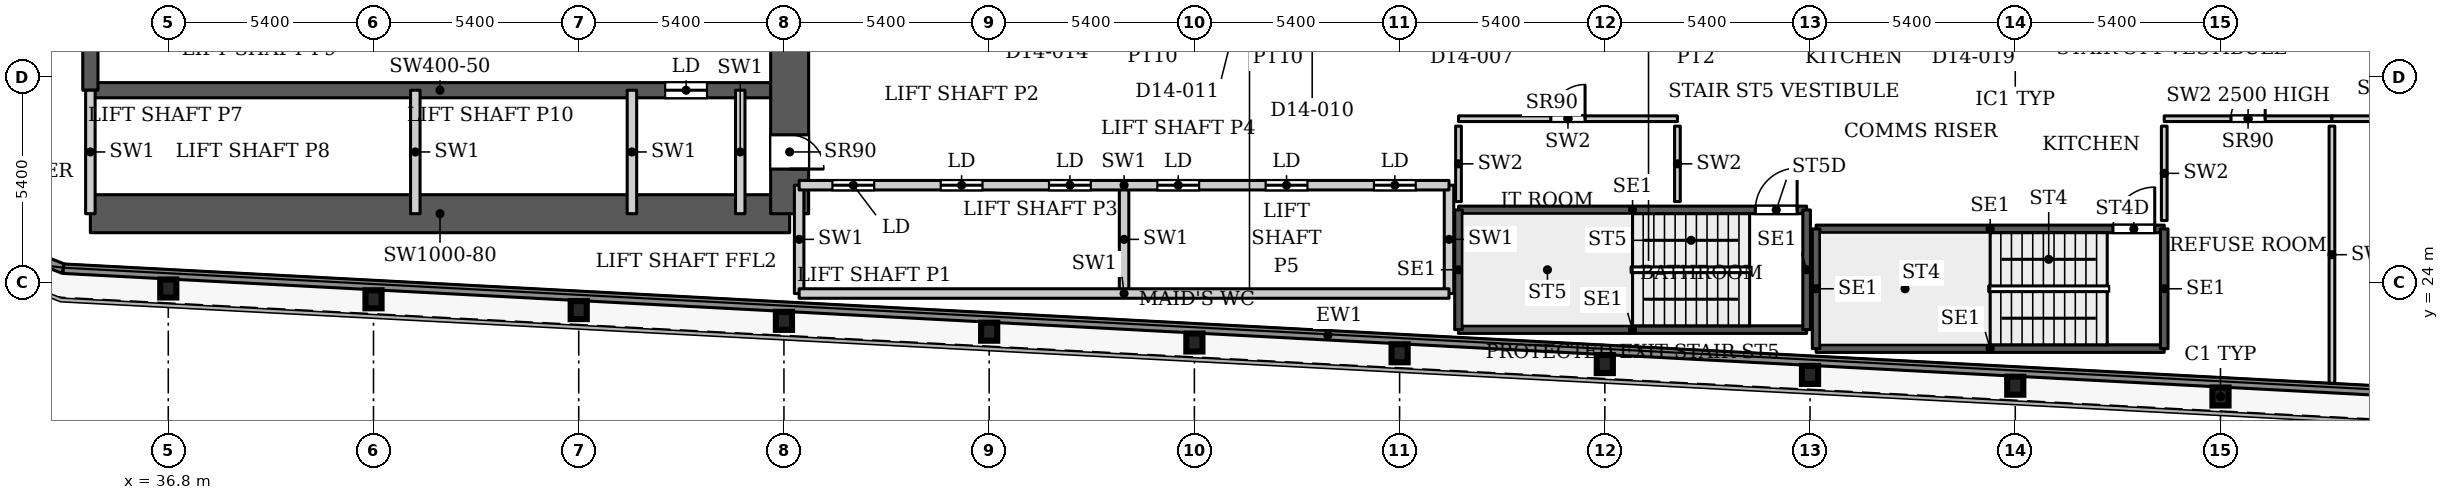
"""IFC4 building model, lengths in metres.
Left out: names, types, materials, properties, quantities, classifications, styles, units other than length and angle.
Written with IfcOpenShell. Run it as: python <this file> out.ifc"""

import sys

from ifc_helpers import new_model, si_unit, direction, frame, frame_2d, origin, origin_2d, place, context, subcontext, project, spatial, rectangle, i_section, extrude, source, transform, mapped, element, fill, save


model = new_model("IFC4")
c1 = context("Model", 3, precision=1e-05, world=origin(), true_north=direction((0.0, 1.0)))
c2 = subcontext(c1, "Body", "Model", "MODEL_VIEW")
j1 = project(units=[si_unit("LENGTHUNIT", "METRE"), si_unit("PLANEANGLEUNIT", "RADIAN")], contexts=[c1])
p1 = place(None, origin())
s1 = spatial("IfcSite", under=j1, at=p1, CompositionType="ELEMENT")
p2 = place(p1, origin())
s2 = spatial("IfcBuilding", under=s1, at=p2, CompositionType="ELEMENT")
p3 = place(p2, frame((0.0, 0.0, 69.5)))
s3 = spatial("IfcBuildingStorey", under=s2, at=p3, CompositionType="ELEMENT", Elevation=69.5)
for number, where, z_axis, x_axis in (
    (1, (90.8, 20.99, 0.0), (0.0, 0.0, 1.0), (1.0, 0.0, 0.0)),
    (2, (85.4, 21.274, 0.0), (0.0, 0.0, 1.0), (1.0, 0.0, 0.0)),
    (3, (80.0, 21.558, 0.0), (0.0, 0.0, 1.0), (1.0, 0.0, 0.0)),
    (4, (74.6, 21.843, 0.0), (0.0, 0.0, 1.0), (1.0, 0.0, 0.0)),
    (5, (69.2, 22.127, 0.0), (0.0, 0.0, 1.0), (1.0, 0.0, 0.0)),
    (6, (63.8, 22.411, 0.0), (0.0, 0.0, 1.0), (1.0, 0.0, 0.0)),
    (7, (58.4, 22.695, 0.0), (0.0, 0.0, 1.0), (1.0, 0.0, 0.0)),
    (8, (53.0, 22.98, 0.0), (0.0, 0.0, 1.0), (1.0, 0.0, 0.0)),
    (9, (47.6, 23.264, 0.0), (0.0, 0.0, 1.0), (1.0, 0.0, 0.0)),
    (10, (42.2, 23.548, 0.0), (0.0, 0.0, 1.0), (1.0, 0.0, 0.0)),
    (11, (36.8, 23.832, 0.0), (0.0, 0.0, 1.0), (1.0, 0.0, 0.0)),
):
    element("IfcColumn", number, at=place(p3, frame(where, z_axis=z_axis, x_axis=x_axis)), inside=s3, PredefinedType="COLUMN", context=c2, shape_type="SweptSolid", body=[
        extrude(i_section(OverallWidth=0.424, OverallDepth=0.474, WebThickness=0.048, FlangeThickness=0.077, FilletRadius=0.014, at=origin_2d()), origin(), (0.0, 0.0, 1.0), 3.9),
    ])
p4 = place(p3, frame((34.75, 25.8, 0.0), z_axis=(0.0, 0.0, 1.0), x_axis=(1.0, 0.0, 0.0)))
e12 = element("IfcWall", 12, at=p4, inside=s3, PredefinedType="SHEAR", context=c2, shape_type="SweptSolid", body=[
    extrude(rectangle(XDim=18.4, YDim=1.0, at=frame_2d((9.2, 0.0))), origin(), (0.0, 0.0, 1.0), 3.9),
])
p5 = place(p3, frame((34.75, 29.05, 0.0), z_axis=(0.0, 0.0, 1.0), x_axis=(1.0, 0.0, 0.0)))
e13 = element("IfcWall", 13, at=p5, inside=s3, PredefinedType="SHEAR", context=c2, shape_type="SweptSolid", body=[
    extrude(rectangle(XDim=18.4, YDim=0.4, at=frame_2d((9.2, 0.0))), origin(), (0.0, 0.0, 1.0), 3.9),
])
p6 = place(p5, frame((15.125, 0.0, 0.0)))
e14 = element("IfcOpeningElement", 14, at=p6, cuts=e13, PredefinedType="OPENING", context=c2, shape_type="SweptSolid", body=[
    extrude(rectangle(XDim=1.1, YDim=2.2, at=frame_2d((0.55, 1.1))), frame((0.0, 0.21, 0.0), z_axis=(0.0, -1.0, 0.0), x_axis=(1.0, 0.0, 0.0)), (0.0, 0.0, 1.0), 0.42),
])
p7 = place(p3, frame((34.75, 29.05, 0.0), z_axis=(0.0, 0.0, 1.0), x_axis=(0.0, 1.0, 0.0)))
e15 = element("IfcWall", 15, at=p7, inside=s3, PredefinedType="SHEAR", context=c2, shape_type="SweptSolid", body=[
    extrude(rectangle(XDim=18.45, YDim=0.4, at=frame_2d((9.225, 0.0))), origin(), (0.0, 0.0, 1.0), 3.9),
])
p8 = place(p7, frame((8.025, 0.0, 0.0)))
e16 = element("IfcOpeningElement", 16, at=p8, cuts=e15, PredefinedType="OPENING", context=c2, shape_type="SweptSolid", body=[
    extrude(rectangle(XDim=1.1, YDim=2.2, at=frame_2d((0.55, 1.1))), frame((0.0, 0.21, 0.0), z_axis=(0.0, -1.0, 0.0), x_axis=(1.0, 0.0, 0.0)), (0.0, 0.0, 1.0), 0.42),
])
p9 = place(p7, frame((10.875, 0.0, 0.0)))
e17 = element("IfcOpeningElement", 17, at=p9, cuts=e15, PredefinedType="OPENING", context=c2, shape_type="SweptSolid", body=[
    extrude(rectangle(XDim=1.1, YDim=2.2, at=frame_2d((0.55, 1.1))), frame((0.0, 0.21, 0.0), z_axis=(0.0, -1.0, 0.0), x_axis=(1.0, 0.0, 0.0)), (0.0, 0.0, 1.0), 0.42),
])
p10 = place(p7, frame((13.725, 0.0, 0.0)))
e18 = element("IfcOpeningElement", 18, at=p10, cuts=e15, PredefinedType="OPENING", context=c2, shape_type="SweptSolid", body=[
    extrude(rectangle(XDim=1.1, YDim=2.2, at=frame_2d((0.55, 1.1))), frame((0.0, 0.21, 0.0), z_axis=(0.0, -1.0, 0.0), x_axis=(1.0, 0.0, 0.0)), (0.0, 0.0, 1.0), 0.42),
])
p11 = place(p7, frame((15.95, 0.0, 0.0)))
e19 = element("IfcOpeningElement", 19, at=p11, cuts=e15, PredefinedType="OPENING", context=c2, shape_type="SweptSolid", body=[
    extrude(rectangle(XDim=1.1, YDim=2.2, at=frame_2d((0.55, 1.1))), frame((0.0, 0.21, 0.0), z_axis=(0.0, -1.0, 0.0), x_axis=(1.0, 0.0, 0.0)), (0.0, 0.0, 1.0), 0.42),
])
p12 = place(p3, frame((53.15, 25.8, 0.0), z_axis=(0.0, 0.0, 1.0), x_axis=(0.0, 1.0, 0.0)))
e20 = element("IfcWall", 20, at=p12, inside=s3, PredefinedType="SHEAR", context=c2, shape_type="SweptSolid", body=[
    extrude(rectangle(XDim=10.4, YDim=1.0, at=frame_2d((5.2, 0.0))), origin(), (0.0, 0.0, 1.0), 3.9),
])
p13 = place(p12, frame((1.175, 0.0, 0.0)))
e21 = element("IfcOpeningElement", 21, at=p13, cuts=e20, PredefinedType="OPENING", context=c2, shape_type="SweptSolid", body=[
    extrude(rectangle(XDim=0.9, YDim=2.2, at=frame_2d((0.45, 1.1))), frame((0.0, 0.51, 0.0), z_axis=(0.0, -1.0, 0.0), x_axis=(1.0, 0.0, 0.0)), (0.0, 0.0, 1.0), 1.02),
])
p14 = place(p3, frame((34.039, 24.353, 0.0), z_axis=(0.0, 0.0, 1.0), x_axis=(-0.929352825399, 0.369192803184, 0.0)))
e22 = element("IfcWall", 22, at=p14, inside=s3, PredefinedType="SOLIDWALL", context=c2, shape_type="SweptSolid", body=[
    extrude(rectangle(XDim=4.656, YDim=0.25, at=frame_2d((2.328, 0.0))), origin(), (0.0, 0.0, 1.0), 3.75),
])
p15 = place(p3, frame((100.586, 20.85, 0.0), z_axis=(0.0, 0.0, 1.0), x_axis=(-0.99861746497, 0.052565755559, 0.0)))
e23 = element("IfcWall", 23, at=p15, inside=s3, PredefinedType="SOLIDWALL", context=c2, shape_type="SweptSolid", body=[
    extrude(rectangle(XDim=66.639, YDim=0.25, at=frame_2d((33.319, 0.0))), origin(), (0.0, 0.0, 1.0), 3.75),
])
p16 = place(p3, frame((80.16, 22.25, 0.0), z_axis=(0.0, 0.0, 1.0), x_axis=(1.0, 0.0, 0.0)))
e24 = element("IfcWall", 24, at=p16, inside=s3, PredefinedType="SHEAR", context=c2, shape_type="SweptSolid", body=[
    extrude(rectangle(XDim=9.16, YDim=0.2, at=frame_2d((4.58, 0.0))), origin(), (0.0, 0.0, 1.0), 3.9),
])
p17 = place(p3, frame((80.16, 25.4, 0.0), z_axis=(0.0, 0.0, 1.0), x_axis=(1.0, 0.0, 0.0)))
e25 = element("IfcWall", 25, at=p17, inside=s3, PredefinedType="SHEAR", context=c2, shape_type="SweptSolid", body=[
    extrude(rectangle(XDim=9.16, YDim=0.2, at=frame_2d((4.58, 0.0))), origin(), (0.0, 0.0, 1.0), 3.9),
])
p18 = place(p17, frame((7.81, 0.0, 0.0)))
e26 = element("IfcOpeningElement", 26, at=p18, cuts=e25, PredefinedType="OPENING", context=c2, shape_type="SweptSolid", body=[
    extrude(rectangle(XDim=1.1, YDim=2.2, at=frame_2d((0.55, 1.1))), frame((0.0, 0.11, 0.0), z_axis=(0.0, -1.0, 0.0), x_axis=(1.0, 0.0, 0.0)), (0.0, 0.0, 1.0), 0.22),
])
for number, where, z_axis, x_axis in (
    (27, (80.16, 22.25, 0.0), (0.0, 0.0, 1.0), (0.0, 1.0, 0.0)),
    (28, (89.32, 22.25, 0.0), (0.0, 0.0, 1.0), (0.0, 1.0, 0.0)),
):
    element("IfcWall", number, at=place(p3, frame(where, z_axis=z_axis, x_axis=x_axis)), inside=s3, PredefinedType="SHEAR", context=c2, shape_type="SweptSolid", body=[
        extrude(rectangle(XDim=3.15, YDim=0.2, at=frame_2d((1.575, 0.0))), origin(), (0.0, 0.0, 1.0), 3.9),
    ])
p19 = place(p3, frame((70.75, 22.75, 0.0), z_axis=(0.0, 0.0, 1.0), x_axis=(1.0, 0.0, 0.0)))
e29 = element("IfcWall", 29, at=p19, inside=s3, PredefinedType="SHEAR", context=c2, shape_type="SweptSolid", body=[
    extrude(rectangle(XDim=9.16, YDim=0.2, at=frame_2d((4.58, 0.0))), origin(), (0.0, 0.0, 1.0), 3.9),
])
p20 = place(p3, frame((70.75, 25.9, 0.0), z_axis=(0.0, 0.0, 1.0), x_axis=(1.0, 0.0, 0.0)))
e30 = element("IfcWall", 30, at=p20, inside=s3, PredefinedType="SHEAR", context=c2, shape_type="SweptSolid", body=[
    extrude(rectangle(XDim=9.16, YDim=0.2, at=frame_2d((4.58, 0.0))), origin(), (0.0, 0.0, 1.0), 3.9),
])
p21 = place(p20, frame((7.81, 0.0, 0.0)))
e31 = element("IfcOpeningElement", 31, at=p21, cuts=e30, PredefinedType="OPENING", context=c2, shape_type="SweptSolid", body=[
    extrude(rectangle(XDim=1.1, YDim=2.2, at=frame_2d((0.55, 1.1))), frame((0.0, 0.11, 0.0), z_axis=(0.0, -1.0, 0.0), x_axis=(1.0, 0.0, 0.0)), (0.0, 0.0, 1.0), 0.22),
])
for number, where, z_axis, x_axis in (
    (32, (70.75, 22.75, 0.0), (0.0, 0.0, 1.0), (0.0, 1.0, 0.0)),
    (33, (79.91, 22.75, 0.0), (0.0, 0.0, 1.0), (0.0, 1.0, 0.0)),
):
    element("IfcWall", number, at=place(p3, frame(where, z_axis=z_axis, x_axis=x_axis)), inside=s3, PredefinedType="SHEAR", context=c2, shape_type="SweptSolid", body=[
        extrude(rectangle(XDim=3.15, YDim=0.2, at=frame_2d((1.575, 0.0))), origin(), (0.0, 0.0, 1.0), 3.9),
    ])
for number, where, z_axis, x_axis in (
    (34, (34.75, 25.8, 0.0), (0.0, 0.0, 1.0), (0.0, 1.0, 0.0)),
    (35, (43.3, 25.8, 0.0), (0.0, 0.0, 1.0), (0.0, 1.0, 0.0)),
    (36, (49.0, 25.8, 0.0), (0.0, 0.0, 1.0), (0.0, 1.0, 0.0)),
    (37, (51.85, 25.8, 0.0), (0.0, 0.0, 1.0), (0.0, 1.0, 0.0)),
):
    element("IfcWall", number, at=place(p3, frame(where, z_axis=z_axis, x_axis=x_axis)), inside=s3, PredefinedType="PARTITIONING", context=c2, shape_type="SweptSolid", body=[
        extrude(rectangle(XDim=3.25, YDim=0.25, at=frame_2d((1.625, 0.0))), origin(), (0.0, 0.0, 1.0), 3.9),
    ])
for number, where, z_axis, x_axis in (
    (38, (53.4, 23.7, 0.0), (0.0, 0.0, 1.0), (0.0, 1.0, 0.0)),
    (39, (61.95, 23.7, 0.0), (0.0, 0.0, 1.0), (0.0, 1.0, 0.0)),
    (40, (70.5, 23.7, 0.0), (0.0, 0.0, 1.0), (0.0, 1.0, 0.0)),
):
    element("IfcWall", number, at=place(p3, frame(where, z_axis=z_axis, x_axis=x_axis)), inside=s3, PredefinedType="PARTITIONING", context=c2, shape_type="SweptSolid", body=[
        extrude(rectangle(XDim=2.85, YDim=0.25, at=frame_2d((1.425, 0.0))), origin(), (0.0, 0.0, 1.0), 3.9),
    ])
p22 = place(p3, frame((53.4, 23.7, 0.0), z_axis=(0.0, 0.0, 1.0), x_axis=(1.0, 0.0, 0.0)))
e41 = element("IfcWall", 41, at=p22, inside=s3, PredefinedType="PARTITIONING", context=c2, shape_type="SweptSolid", body=[
    extrude(rectangle(XDim=17.1, YDim=0.25, at=frame_2d((8.55, 0.0))), origin(), (0.0, 0.0, 1.0), 3.9),
])
p23 = place(p3, frame((53.4, 26.55, 0.0), z_axis=(0.0, 0.0, 1.0), x_axis=(1.0, 0.0, 0.0)))
e42 = element("IfcWall", 42, at=p23, inside=s3, PredefinedType="PARTITIONING", context=c2, shape_type="SweptSolid", body=[
    extrude(rectangle(XDim=17.1, YDim=0.25, at=frame_2d((8.55, 0.0))), origin(), (0.0, 0.0, 1.0), 3.9),
])
p24 = place(p23, frame((0.875, 0.0, 0.0)))
e43 = element("IfcOpeningElement", 43, at=p24, cuts=e42, PredefinedType="OPENING", context=c2, shape_type="SweptSolid", body=[
    extrude(rectangle(XDim=1.1, YDim=2.2, at=frame_2d((0.55, 1.1))), frame((0.0, 0.135, 0.0), z_axis=(0.0, -1.0, 0.0), x_axis=(1.0, 0.0, 0.0)), (0.0, 0.0, 1.0), 0.27),
])
p25 = place(p23, frame((3.725, 0.0, 0.0)))
e44 = element("IfcOpeningElement", 44, at=p25, cuts=e42, PredefinedType="OPENING", context=c2, shape_type="SweptSolid", body=[
    extrude(rectangle(XDim=1.1, YDim=2.2, at=frame_2d((0.55, 1.1))), frame((0.0, 0.135, 0.0), z_axis=(0.0, -1.0, 0.0), x_axis=(1.0, 0.0, 0.0)), (0.0, 0.0, 1.0), 0.27),
])
p26 = place(p23, frame((6.575, 0.0, 0.0)))
e45 = element("IfcOpeningElement", 45, at=p26, cuts=e42, PredefinedType="OPENING", context=c2, shape_type="SweptSolid", body=[
    extrude(rectangle(XDim=1.1, YDim=2.2, at=frame_2d((0.55, 1.1))), frame((0.0, 0.135, 0.0), z_axis=(0.0, -1.0, 0.0), x_axis=(1.0, 0.0, 0.0)), (0.0, 0.0, 1.0), 0.27),
])
p27 = place(p23, frame((9.425, 0.0, 0.0)))
e46 = element("IfcOpeningElement", 46, at=p27, cuts=e42, PredefinedType="OPENING", context=c2, shape_type="SweptSolid", body=[
    extrude(rectangle(XDim=1.1, YDim=2.2, at=frame_2d((0.55, 1.1))), frame((0.0, 0.135, 0.0), z_axis=(0.0, -1.0, 0.0), x_axis=(1.0, 0.0, 0.0)), (0.0, 0.0, 1.0), 0.27),
])
p28 = place(p23, frame((12.275, 0.0, 0.0)))
e47 = element("IfcOpeningElement", 47, at=p28, cuts=e42, PredefinedType="OPENING", context=c2, shape_type="SweptSolid", body=[
    extrude(rectangle(XDim=1.1, YDim=2.2, at=frame_2d((0.55, 1.1))), frame((0.0, 0.135, 0.0), z_axis=(0.0, -1.0, 0.0), x_axis=(1.0, 0.0, 0.0)), (0.0, 0.0, 1.0), 0.27),
])
p29 = place(p23, frame((15.125, 0.0, 0.0)))
e48 = element("IfcOpeningElement", 48, at=p29, cuts=e42, PredefinedType="OPENING", context=c2, shape_type="SweptSolid", body=[
    extrude(rectangle(XDim=1.1, YDim=2.2, at=frame_2d((0.55, 1.1))), frame((0.0, 0.135, 0.0), z_axis=(0.0, -1.0, 0.0), x_axis=(1.0, 0.0, 0.0)), (0.0, 0.0, 1.0), 0.27),
])
p30 = place(p3, frame((70.75, 28.3, 0.0), z_axis=(0.0, 0.0, 1.0), x_axis=(1.0, 0.0, 0.0)))
e49 = element("IfcWall", 49, at=p30, inside=s3, PredefinedType="PARTITIONING", context=c2, shape_type="SweptSolid", body=[
    extrude(rectangle(XDim=5.76, YDim=0.15, at=frame_2d((2.88, 0.0))), origin(), (0.0, 0.0, 1.0), 3.9),
])
p31 = place(p30, frame((2.43, 0.0, 0.0)))
e50 = element("IfcOpeningElement", 50, at=p31, cuts=e49, PredefinedType="OPENING", context=c2, shape_type="SweptSolid", body=[
    extrude(rectangle(XDim=0.9, YDim=2.2, at=frame_2d((0.45, 1.1))), frame((0.0, 0.085, 0.0), z_axis=(0.0, -1.0, 0.0), x_axis=(1.0, 0.0, 0.0)), (0.0, 0.0, 1.0), 0.17),
])
for number, where, z_axis, x_axis in (
    (51, (70.75, 26.12, 0.0), (0.0, 0.0, 1.0), (0.0, 1.0, 0.0)),
    (52, (76.51, 26.12, 0.0), (0.0, 0.0, 1.0), (0.0, 1.0, 0.0)),
):
    element("IfcWall", number, at=place(p3, frame(where, z_axis=z_axis, x_axis=x_axis)), inside=s3, PredefinedType="PARTITIONING", context=c2, shape_type="SweptSolid", body=[
        extrude(rectangle(XDim=1.985, YDim=0.15, at=frame_2d((0.992, 0.0))), origin(), (0.0, 0.0, 1.0), 3.9),
    ])
p32 = place(p3, frame((89.32, 28.3, 0.0), z_axis=(0.0, 0.0, 1.0), x_axis=(1.0, 0.0, 0.0)))
e53 = element("IfcWall", 53, at=p32, inside=s3, PredefinedType="PARTITIONING", context=c2, shape_type="SweptSolid", body=[
    extrude(rectangle(XDim=4.413, YDim=0.15, at=frame_2d((2.207, 0.0))), origin(), (0.0, 0.0, 1.0), 2.5),
])
p33 = place(p32, frame((1.756, 0.0, 0.0)))
e54 = element("IfcOpeningElement", 54, at=p33, cuts=e53, PredefinedType="OPENING", context=c2, shape_type="SweptSolid", body=[
    extrude(rectangle(XDim=0.9, YDim=2.2, at=frame_2d((0.45, 1.1))), frame((0.0, 0.085, 0.0), z_axis=(0.0, -1.0, 0.0), x_axis=(1.0, 0.0, 0.0)), (0.0, 0.0, 1.0), 0.17),
])
p34 = place(p3, frame((89.32, 25.62, 0.0), z_axis=(0.0, 0.0, 1.0), x_axis=(0.0, 1.0, 0.0)))
e55 = element("IfcWall", 55, at=p34, inside=s3, PredefinedType="PARTITIONING", context=c2, shape_type="SweptSolid", body=[
    extrude(rectangle(XDim=2.485, YDim=0.15, at=frame_2d((1.242, 0.0))), origin(), (0.0, 0.0, 1.0), 3.9),
])
p35 = place(p3, frame((93.733, 21.338, 0.0), z_axis=(0.0, 0.0, 1.0), x_axis=(0.0, 1.0, 0.0)))
e56 = element("IfcWall", 56, at=p35, inside=s3, PredefinedType="PARTITIONING", context=c2, shape_type="SweptSolid", body=[
    extrude(rectangle(XDim=6.767, YDim=0.15, at=frame_2d((3.384, 0.0))), origin(), (0.0, 0.0, 1.0), 3.9),
])
p36 = place(p3, frame((93.733, 28.3, 0.0), z_axis=(0.0, 0.0, 1.0), x_axis=(1.0, 0.0, 0.0)))
e57 = element("IfcWall", 57, at=p36, inside=s3, PredefinedType="PARTITIONING", context=c2, shape_type="SweptSolid", body=[
    extrude(rectangle(XDim=6.165, YDim=0.15, at=frame_2d((3.083, 0.0))), origin(), (0.0, 0.0, 1.0), 3.9),
])
p37 = place(p36, frame((1.683, 0.0, 0.0)))
e58 = element("IfcOpeningElement", 58, at=p37, cuts=e57, PredefinedType="OPENING", context=c2, shape_type="SweptSolid", body=[
    extrude(rectangle(XDim=0.9, YDim=2.2, at=frame_2d((0.45, 1.1))), frame((0.0, 0.085, 0.0), z_axis=(0.0, -1.0, 0.0), x_axis=(1.0, 0.0, 0.0)), (0.0, 0.0, 1.0), 0.17),
])
m1 = source(origin(), c2, "Body", "SweptSolid", [
    extrude(rectangle(XDim=1.1, YDim=2.2, at=frame_2d((0.55, 1.1))), frame((0.0, 0.025, 0.0), z_axis=(0.0, -1.0, 0.0), x_axis=(1.0, 0.0, 0.0)), (0.0, 0.0, 1.0), 0.05),
])
p38 = place(p24, origin())
e59 = element("IfcDoor", 59, at=p38, inside=s3, OperationType="SLIDING_TO_LEFT", PredefinedType="DOOR", context=c2, shape_type="MappedRepresentation", body=[
    mapped(m1, transform((0.0, 0.0, 0.0), x_axis=(1.0, 0.0, 0.0), y_axis=(0.0, 1.0, 0.0), z_axis=(0.0, 0.0, 1.0), scale=1.0)),
])
fill(e43, e59)
p39 = place(p25, origin())
e60 = element("IfcDoor", 60, at=p39, inside=s3, OperationType="SLIDING_TO_LEFT", PredefinedType="DOOR", context=c2, shape_type="MappedRepresentation", body=[
    mapped(m1, transform((0.0, 0.0, 0.0), x_axis=(1.0, 0.0, 0.0), y_axis=(0.0, 1.0, 0.0), z_axis=(0.0, 0.0, 1.0), scale=1.0)),
])
fill(e44, e60)
p40 = place(p26, origin())
e61 = element("IfcDoor", 61, at=p40, inside=s3, OperationType="SLIDING_TO_LEFT", PredefinedType="DOOR", context=c2, shape_type="MappedRepresentation", body=[
    mapped(m1, transform((0.0, 0.0, 0.0), x_axis=(1.0, 0.0, 0.0), y_axis=(0.0, 1.0, 0.0), z_axis=(0.0, 0.0, 1.0), scale=1.0)),
])
fill(e45, e61)
p41 = place(p27, origin())
e62 = element("IfcDoor", 62, at=p41, inside=s3, OperationType="SLIDING_TO_LEFT", PredefinedType="DOOR", context=c2, shape_type="MappedRepresentation", body=[
    mapped(m1, transform((0.0, 0.0, 0.0), x_axis=(1.0, 0.0, 0.0), y_axis=(0.0, 1.0, 0.0), z_axis=(0.0, 0.0, 1.0), scale=1.0)),
])
fill(e46, e62)
p42 = place(p28, origin())
e63 = element("IfcDoor", 63, at=p42, inside=s3, OperationType="SLIDING_TO_LEFT", PredefinedType="DOOR", context=c2, shape_type="MappedRepresentation", body=[
    mapped(m1, transform((0.0, 0.0, 0.0), x_axis=(1.0, 0.0, 0.0), y_axis=(0.0, 1.0, 0.0), z_axis=(0.0, 0.0, 1.0), scale=1.0)),
])
fill(e47, e63)
p43 = place(p29, origin())
e64 = element("IfcDoor", 64, at=p43, inside=s3, OperationType="SLIDING_TO_LEFT", PredefinedType="DOOR", context=c2, shape_type="MappedRepresentation", body=[
    mapped(m1, transform((0.0, 0.0, 0.0), x_axis=(1.0, 0.0, 0.0), y_axis=(0.0, 1.0, 0.0), z_axis=(0.0, 0.0, 1.0), scale=1.0)),
])
fill(e48, e64)
p44 = place(p6, origin())
e65 = element("IfcDoor", 65, at=p44, inside=s3, OperationType="SLIDING_TO_LEFT", PredefinedType="DOOR", context=c2, shape_type="MappedRepresentation", body=[
    mapped(m1, transform((0.0, 0.0, 0.0), x_axis=(1.0, 0.0, 0.0), y_axis=(0.0, 1.0, 0.0), z_axis=(0.0, 0.0, 1.0), scale=1.0)),
])
fill(e14, e65)
m2 = source(origin(), c2, "Body", "SweptSolid", [
    extrude(rectangle(XDim=0.9, YDim=2.2, at=frame_2d((0.45, 1.1))), frame((0.0, 0.025, 0.0), z_axis=(0.0, -1.0, 0.0), x_axis=(1.0, 0.0, 0.0)), (0.0, 0.0, 1.0), 0.05),
])
p45 = place(p13, origin())
e66 = element("IfcDoor", 66, at=p45, inside=s3, OperationType="SINGLE_SWING_RIGHT", PredefinedType="DOOR", context=c2, shape_type="MappedRepresentation", body=[
    mapped(m2, transform((0.0, 0.0, 0.0), x_axis=(1.0, 0.0, 0.0), y_axis=(0.0, 1.0, 0.0), z_axis=(0.0, 0.0, 1.0), scale=1.0)),
])
fill(e21, e66)
p46 = place(p31, origin())
e67 = element("IfcDoor", 67, at=p46, inside=s3, OperationType="SINGLE_SWING_LEFT", PredefinedType="DOOR", context=c2, shape_type="MappedRepresentation", body=[
    mapped(m2, transform((0.0, 0.0, 0.0), x_axis=(1.0, 0.0, 0.0), y_axis=(0.0, 1.0, 0.0), z_axis=(0.0, 0.0, 1.0), scale=1.0)),
])
fill(e50, e67)
p47 = place(p33, origin())
e68 = element("IfcDoor", 68, at=p47, inside=s3, OperationType="SINGLE_SWING_LEFT", PredefinedType="DOOR", context=c2, shape_type="MappedRepresentation", body=[
    mapped(m2, transform((0.0, 0.0, 0.0), x_axis=(1.0, 0.0, 0.0), y_axis=(0.0, 1.0, 0.0), z_axis=(0.0, 0.0, 1.0), scale=1.0)),
])
fill(e54, e68)
m3 = source(origin(), c2, "Body", "SweptSolid", [
    extrude(rectangle(XDim=1.1, YDim=2.2, at=frame_2d((0.55, 1.1))), frame((0.0, 0.025, 0.0), z_axis=(0.0, -1.0, 0.0), x_axis=(1.0, 0.0, 0.0)), (0.0, 0.0, 1.0), 0.05),
])
p48 = place(p18, origin())
e69 = element("IfcDoor", 69, at=p48, inside=s3, OperationType="SINGLE_SWING_LEFT", PredefinedType="DOOR", context=c2, shape_type="MappedRepresentation", body=[
    mapped(m3, transform((0.0, 0.0, 0.0), x_axis=(1.0, 0.0, 0.0), y_axis=(0.0, 1.0, 0.0), z_axis=(0.0, 0.0, 1.0), scale=1.0)),
])
fill(e26, e69)
p49 = place(p21, origin())
e70 = element("IfcDoor", 70, at=p49, inside=s3, OperationType="SINGLE_SWING_LEFT", PredefinedType="DOOR", context=c2, shape_type="MappedRepresentation", body=[
    mapped(m3, transform((0.0, 0.0, 0.0), x_axis=(1.0, 0.0, 0.0), y_axis=(0.0, 1.0, 0.0), z_axis=(0.0, 0.0, 1.0), scale=1.0)),
])
fill(e31, e70)
save(model, sys.argv[1])
